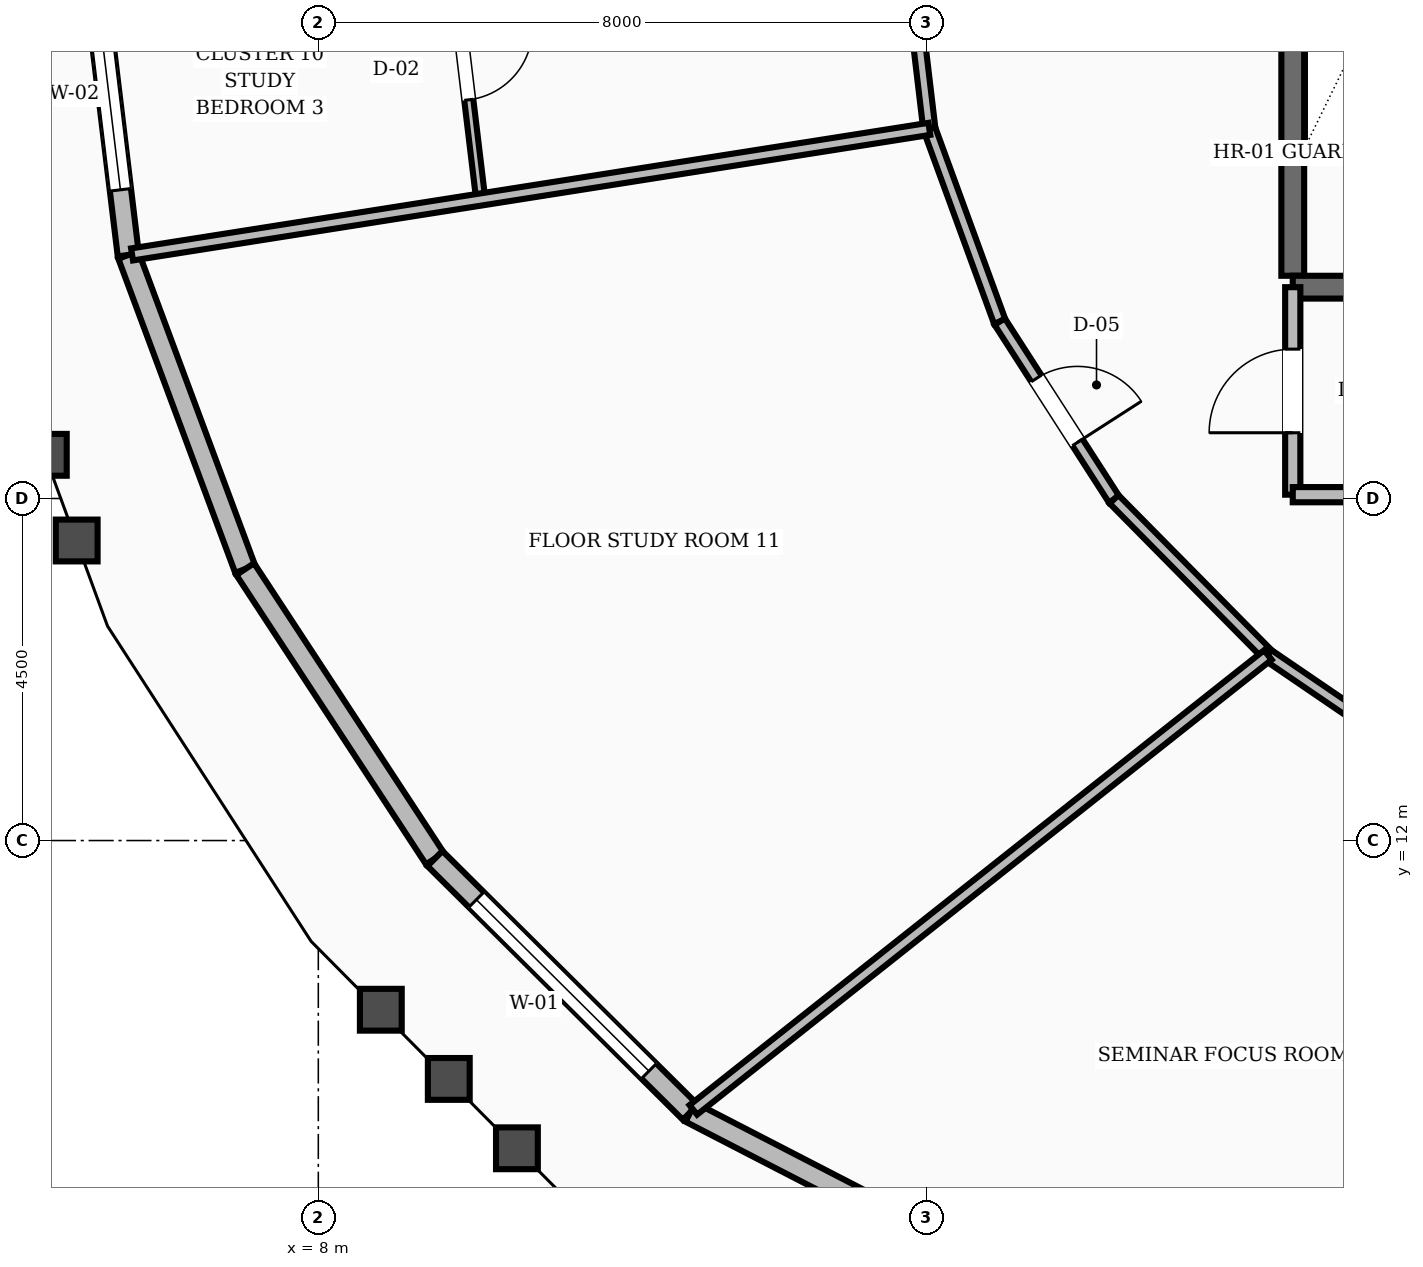
"""IFC4 building model, lengths in metres.
Left out: names, types, materials, properties, quantities, classifications, styles, units other than length and angle.
Written with IfcOpenShell. Run it as: python <this file> out.ifc"""

import sys

from ifc_helpers import new_model, si_unit, direction, frame, frame_2d, origin, place, context, subcontext, project, spatial, rectangle, extrude, element, fill, save


model = new_model("IFC4")
c1 = context("Model", 3, precision=1e-05, world=origin(), true_north=direction((0.0, 1.0)))
c2 = subcontext(c1, "Body", "Model", "MODEL_VIEW")
j1 = project(units=[si_unit("LENGTHUNIT", "METRE"), si_unit("PLANEANGLEUNIT", "RADIAN")], contexts=[c1])
p1 = place(None, origin())
s1 = spatial("IfcSite", under=j1, at=p1, CompositionType="ELEMENT")
p2 = place(p1, origin())
s2 = spatial("IfcBuilding", under=s1, at=p2, CompositionType="ELEMENT")
p3 = place(p2, frame((0.0, 0.0, 84.4)))
s3 = spatial("IfcBuildingStorey", under=s2, at=p3, CompositionType="ELEMENT", Elevation=84.4)
p4 = place(p3, frame((20.82, 19.43, 0.0), z_axis=(0.0, 0.0, 1.0), x_axis=(0.0, 1.0, 0.0)))
e1 = element("IfcWall", 1, at=p4, inside=s3, PredefinedType="SHEAR", context=c2, shape_type="SweptSolid", body=[
    extrude(rectangle(XDim=8.74, YDim=0.3, at=frame_2d((4.37, 0.0))), origin(), (0.0, 0.0, 1.0), 3.6),
])
p5 = place(p3, frame((20.82, 19.28, 0.0), z_axis=(0.0, 0.0, 1.0), x_axis=(1.0, 0.0, 0.0)))
e2 = element("IfcWall", 2, at=p5, inside=s3, PredefinedType="SHEAR", context=c2, shape_type="SweptSolid", body=[
    extrude(rectangle(XDim=3.6, YDim=0.3, at=frame_2d((1.8, 0.0))), origin(), (0.0, 0.0, 1.0), 3.6),
])
p6 = place(p5, frame((1.3, 0.0, 0.0)))
e3 = element("IfcOpeningElement", 3, at=p6, cuts=e2, PredefinedType="OPENING", context=c2, shape_type="SweptSolid", body=[
    extrude(rectangle(XDim=1.1, YDim=2.1, at=frame_2d((0.55, 1.05))), frame((0.0, 0.16, 0.0), z_axis=(0.0, -1.0, 0.0), x_axis=(1.0, 0.0, 0.0)), (0.0, 0.0, 1.0), 0.32),
])
p7 = place(p3, frame((4.981, 24.0, 0.0), z_axis=(0.0, 0.0, 1.0), x_axis=(0.119979283707, -0.99277639551, 0.0)))
e4 = element("IfcWall", 4, at=p7, inside=s3, PredefinedType="STANDARD", context=c2, shape_type="SweptSolid", body=[
    extrude(rectangle(XDim=4.328, YDim=0.28, at=frame_2d((2.164, 0.0))), origin(), (0.0, 0.0, 1.0), 2.71),
])
p8 = place(p7, frame((0.864, 0.0, 0.8)))
e5 = element("IfcOpeningElement", 5, at=p8, cuts=e4, PredefinedType="OPENING", context=c2, shape_type="SweptSolid", body=[
    extrude(rectangle(XDim=2.6, YDim=1.65, at=frame_2d((1.3, 0.825))), frame((0.0, 0.15, 0.0), z_axis=(0.0, -1.0, 0.0), x_axis=(1.0, 0.0, 0.0)), (0.0, 0.0, 1.0), 0.3),
])
p9 = place(p3, frame((5.5, 19.703, 0.0), z_axis=(0.0, 0.0, 1.0), x_axis=(0.348719005739, -0.937227323031, 0.0)))
e6 = element("IfcWall", 6, at=p9, inside=s3, PredefinedType="STANDARD", context=c2, shape_type="SweptSolid", body=[
    extrude(rectangle(XDim=4.409, YDim=0.28, at=frame_2d((2.204, 0.0))), origin(), (0.0, 0.0, 1.0), 2.71),
])
p10 = place(p3, frame((7.038, 15.571, 0.0), z_axis=(0.0, 0.0, 1.0), x_axis=(0.548336678248, -0.836257668, 0.0)))
e7 = element("IfcWall", 7, at=p10, inside=s3, PredefinedType="STANDARD", context=c2, shape_type="SweptSolid", body=[
    extrude(rectangle(XDim=4.553, YDim=0.28, at=frame_2d((2.277, 0.0))), origin(), (0.0, 0.0, 1.0), 2.71),
])
p11 = place(p3, frame((9.534, 11.763, 0.0), z_axis=(0.0, 0.0, 1.0), x_axis=(0.709499676925, -0.704705760189, 0.0)))
e8 = element("IfcWall", 8, at=p11, inside=s3, PredefinedType="STANDARD", context=c2, shape_type="SweptSolid", body=[
    extrude(rectangle(XDim=4.736, YDim=0.28, at=frame_2d((2.368, 0.0))), origin(), (0.0, 0.0, 1.0), 2.71),
])
p12 = place(p11, frame((0.768, 0.0, 0.8)))
e9 = element("IfcOpeningElement", 9, at=p12, cuts=e8, PredefinedType="OPENING", context=c2, shape_type="SweptSolid", body=[
    extrude(rectangle(XDim=3.2, YDim=1.65, at=frame_2d((1.6, 0.825))), frame((0.0, 0.15, 0.0), z_axis=(0.0, -1.0, 0.0), x_axis=(1.0, 0.0, 0.0)), (0.0, 0.0, 1.0), 0.3),
])
p13 = place(p3, frame((12.895, 8.426, 0.0), z_axis=(0.0, 0.0, 1.0), x_axis=(0.888649259328, -0.458587498625, 0.0)))
e10 = element("IfcWall", 10, at=p13, inside=s3, PredefinedType="STANDARD", context=c2, shape_type="SweptSolid", body=[
    extrude(rectangle(XDim=5.05, YDim=0.28, at=frame_2d((2.525, 0.0))), origin(), (0.0, 0.0, 1.0), 2.71),
])
p14 = place(p3, frame((20.82, 16.55, 0.0), z_axis=(0.0, 0.0, 1.0), x_axis=(0.0, 1.0, 0.0)))
e11 = element("IfcWall", 11, at=p14, inside=s3, PredefinedType="SOLIDWALL", context=c2, shape_type="SweptSolid", body=[
    extrude(rectangle(XDim=2.73, YDim=0.2, at=frame_2d((1.365, 0.0))), origin(), (0.0, 0.0, 1.0), 2.71),
])
p15 = place(p14, frame((0.815, 0.0, 0.0)))
e12 = element("IfcOpeningElement", 12, at=p15, cuts=e11, PredefinedType="OPENING", context=c2, shape_type="SweptSolid", body=[
    extrude(rectangle(XDim=1.1, YDim=2.1, at=frame_2d((0.55, 1.05))), frame((0.0, 0.11, 0.0), z_axis=(0.0, -1.0, 0.0), x_axis=(1.0, 0.0, 0.0)), (0.0, 0.0, 1.0), 0.22),
])
p16 = place(p3, frame((20.82, 16.55, 0.0), z_axis=(0.0, 0.0, 1.0), x_axis=(1.0, 0.0, 0.0)))
e13 = element("IfcWall", 13, at=p16, inside=s3, PredefinedType="SOLIDWALL", context=c2, shape_type="SweptSolid", body=[
    extrude(rectangle(XDim=3.98, YDim=0.2, at=frame_2d((1.99, 0.0))), origin(), (0.0, 0.0, 1.0), 2.71),
])
p17 = place(p3, frame((15.726, 24.0, 0.0), z_axis=(0.0, 0.0, 1.0), x_axis=(0.117763961213, -0.99304161516, 0.0)))
e14 = element("IfcWall", 14, at=p17, inside=s3, PredefinedType="SOLIDWALL", context=c2, shape_type="SweptSolid", body=[
    extrude(rectangle(XDim=2.656, YDim=0.16, at=frame_2d((1.328, 0.0))), origin(), (0.0, 0.0, 1.0), 2.71),
])
p18 = place(p3, frame((16.039, 21.363, 0.0), z_axis=(0.0, 0.0, 1.0), x_axis=(0.343013437329, -0.939330496583, 0.0)))
e15 = element("IfcWall", 15, at=p18, inside=s3, PredefinedType="SOLIDWALL", context=c2, shape_type="SweptSolid", body=[
    extrude(rectangle(XDim=2.7, YDim=0.16, at=frame_2d((1.35, 0.0))), origin(), (0.0, 0.0, 1.0), 2.71),
])
p19 = place(p3, frame((16.965, 18.827, 0.0), z_axis=(0.0, 0.0, 1.0), x_axis=(0.541126045017, -0.840941498206, 0.0)))
e16 = element("IfcWall", 16, at=p19, inside=s3, PredefinedType="SOLIDWALL", context=c2, shape_type="SweptSolid", body=[
    extrude(rectangle(XDim=2.779, YDim=0.16, at=frame_2d((1.39, 0.0))), origin(), (0.0, 0.0, 1.0), 2.71),
])
p20 = place(p19, frame((0.89, 0.0, 0.0)))
e17 = element("IfcOpeningElement", 17, at=p20, cuts=e16, PredefinedType="OPENING", context=c2, shape_type="SweptSolid", body=[
    extrude(rectangle(XDim=1.0, YDim=2.1, at=frame_2d((0.5, 1.05))), frame((0.0, 0.09, 0.0), z_axis=(0.0, -1.0, 0.0), x_axis=(1.0, 0.0, 0.0)), (0.0, 0.0, 1.0), 0.18),
])
p21 = place(p3, frame((18.469, 16.49, 0.0), z_axis=(0.0, 0.0, 1.0), x_axis=(0.702811997, -0.711375636969, 0.0)))
e18 = element("IfcWall", 18, at=p21, inside=s3, PredefinedType="SOLIDWALL", context=c2, shape_type="SweptSolid", body=[
    extrude(rectangle(XDim=2.879, YDim=0.16, at=frame_2d((1.44, 0.0))), origin(), (0.0, 0.0, 1.0), 2.71),
])
p22 = place(p3, frame((20.492, 14.441, 0.0), z_axis=(0.0, 0.0, 1.0), x_axis=(0.826293096206, -0.56324037423, 0.0)))
e19 = element("IfcWall", 19, at=p22, inside=s3, PredefinedType="SOLIDWALL", context=c2, shape_type="SweptSolid", body=[
    extrude(rectangle(XDim=2.985, YDim=0.16, at=frame_2d((1.492, 0.0))), origin(), (0.0, 0.0, 1.0), 2.71),
])
p23 = place(p3, frame((9.709, 24.0, 0.0), z_axis=(0.0, 0.0, 1.0), x_axis=(0.119273854906, -0.992861393919, 0.0)))
e20 = element("IfcWall", 20, at=p23, inside=s3, PredefinedType="PARTITIONING", context=c2, shape_type="SweptSolid", body=[
    extrude(rectangle(XDim=3.592, YDim=0.12, at=frame_2d((1.796, 0.0))), origin(), (0.0, 0.0, 1.0), 2.71),
])
p24 = place(p23, frame((1.321, 0.0, 0.0)))
e21 = element("IfcOpeningElement", 21, at=p24, cuts=e20, PredefinedType="OPENING", context=c2, shape_type="SweptSolid", body=[
    extrude(rectangle(XDim=0.95, YDim=2.1, at=frame_2d((0.475, 1.05))), frame((0.0, 0.07, 0.0), z_axis=(0.0, -1.0, 0.0), x_axis=(1.0, 0.0, 0.0)), (0.0, 0.0, 1.0), 0.14),
])
p25 = place(p3, frame((16.039, 21.363, 0.0), z_axis=(0.0, 0.0, 1.0), x_axis=(-0.987825895071, -0.15556349516, 0.0)))
e22 = element("IfcWall", 22, at=p25, inside=s3, PredefinedType="SOLIDWALL", context=c2, shape_type="SweptSolid", body=[
    extrude(rectangle(XDim=10.618, YDim=0.16, at=frame_2d((5.309, 0.0))), origin(), (0.0, 0.0, 1.0), 2.71),
])
p26 = place(p3, frame((20.492, 14.441, 0.0), z_axis=(0.0, 0.0, 1.0), x_axis=(-0.784008851618, -0.620749644047, 0.0)))
e23 = element("IfcWall", 23, at=p26, inside=s3, PredefinedType="SOLIDWALL", context=c2, shape_type="SweptSolid", body=[
    extrude(rectangle(XDim=9.641, YDim=0.16, at=frame_2d((4.82, 0.0))), origin(), (0.0, 0.0, 1.0), 2.71),
])
p27 = place(p8, origin())
e24 = element("IfcWindow", 24, at=p27, inside=s3, PartitioningType="SINGLE_PANEL", PredefinedType="WINDOW", context=c2, shape_type="SweptSolid", body=[
    extrude(rectangle(XDim=2.6, YDim=1.65, at=frame_2d((1.3, 0.825))), frame((0.0, 0.03, 0.0), z_axis=(0.0, -1.0, 0.0), x_axis=(1.0, 0.0, 0.0)), (0.0, 0.0, 1.0), 0.06),
])
fill(e5, e24)
p28 = place(p12, origin())
e25 = element("IfcWindow", 25, at=p28, inside=s3, PartitioningType="SINGLE_PANEL", PredefinedType="WINDOW", context=c2, shape_type="SweptSolid", body=[
    extrude(rectangle(XDim=3.2, YDim=1.65, at=frame_2d((1.6, 0.825))), frame((0.0, 0.03, 0.0), z_axis=(0.0, -1.0, 0.0), x_axis=(1.0, 0.0, 0.0)), (0.0, 0.0, 1.0), 0.06),
])
fill(e9, e25)
p29 = place(p15, origin())
e26 = element("IfcDoor", 26, at=p29, inside=s3, OperationType="SINGLE_SWING_LEFT", PredefinedType="DOOR", context=c2, shape_type="SweptSolid", body=[
    extrude(rectangle(XDim=1.1, YDim=2.1, at=frame_2d((0.55, 1.05))), frame((0.0, 0.025, 0.0), z_axis=(0.0, -1.0, 0.0), x_axis=(1.0, 0.0, 0.0)), (0.0, 0.0, 1.0), 0.05),
])
fill(e12, e26)
p30 = place(p24, origin())
e27 = element("IfcDoor", 27, at=p30, inside=s3, OperationType="SINGLE_SWING_LEFT", PredefinedType="DOOR", context=c2, shape_type="SweptSolid", body=[
    extrude(rectangle(XDim=0.95, YDim=2.1, at=frame_2d((0.475, 1.05))), frame((0.0, 0.025, 0.0), z_axis=(0.0, -1.0, 0.0), x_axis=(1.0, 0.0, 0.0)), (0.0, 0.0, 1.0), 0.05),
])
fill(e21, e27)
p31 = place(p20, origin())
e28 = element("IfcDoor", 28, at=p31, inside=s3, OperationType="SINGLE_SWING_RIGHT", PredefinedType="DOOR", context=c2, shape_type="SweptSolid", body=[
    extrude(rectangle(XDim=1.0, YDim=2.1, at=frame_2d((0.5, 1.05))), frame((0.0, 0.025, 0.0), z_axis=(0.0, -1.0, 0.0), x_axis=(1.0, 0.0, 0.0)), (0.0, 0.0, 1.0), 0.05),
])
fill(e17, e28)
save(model, sys.argv[1])
